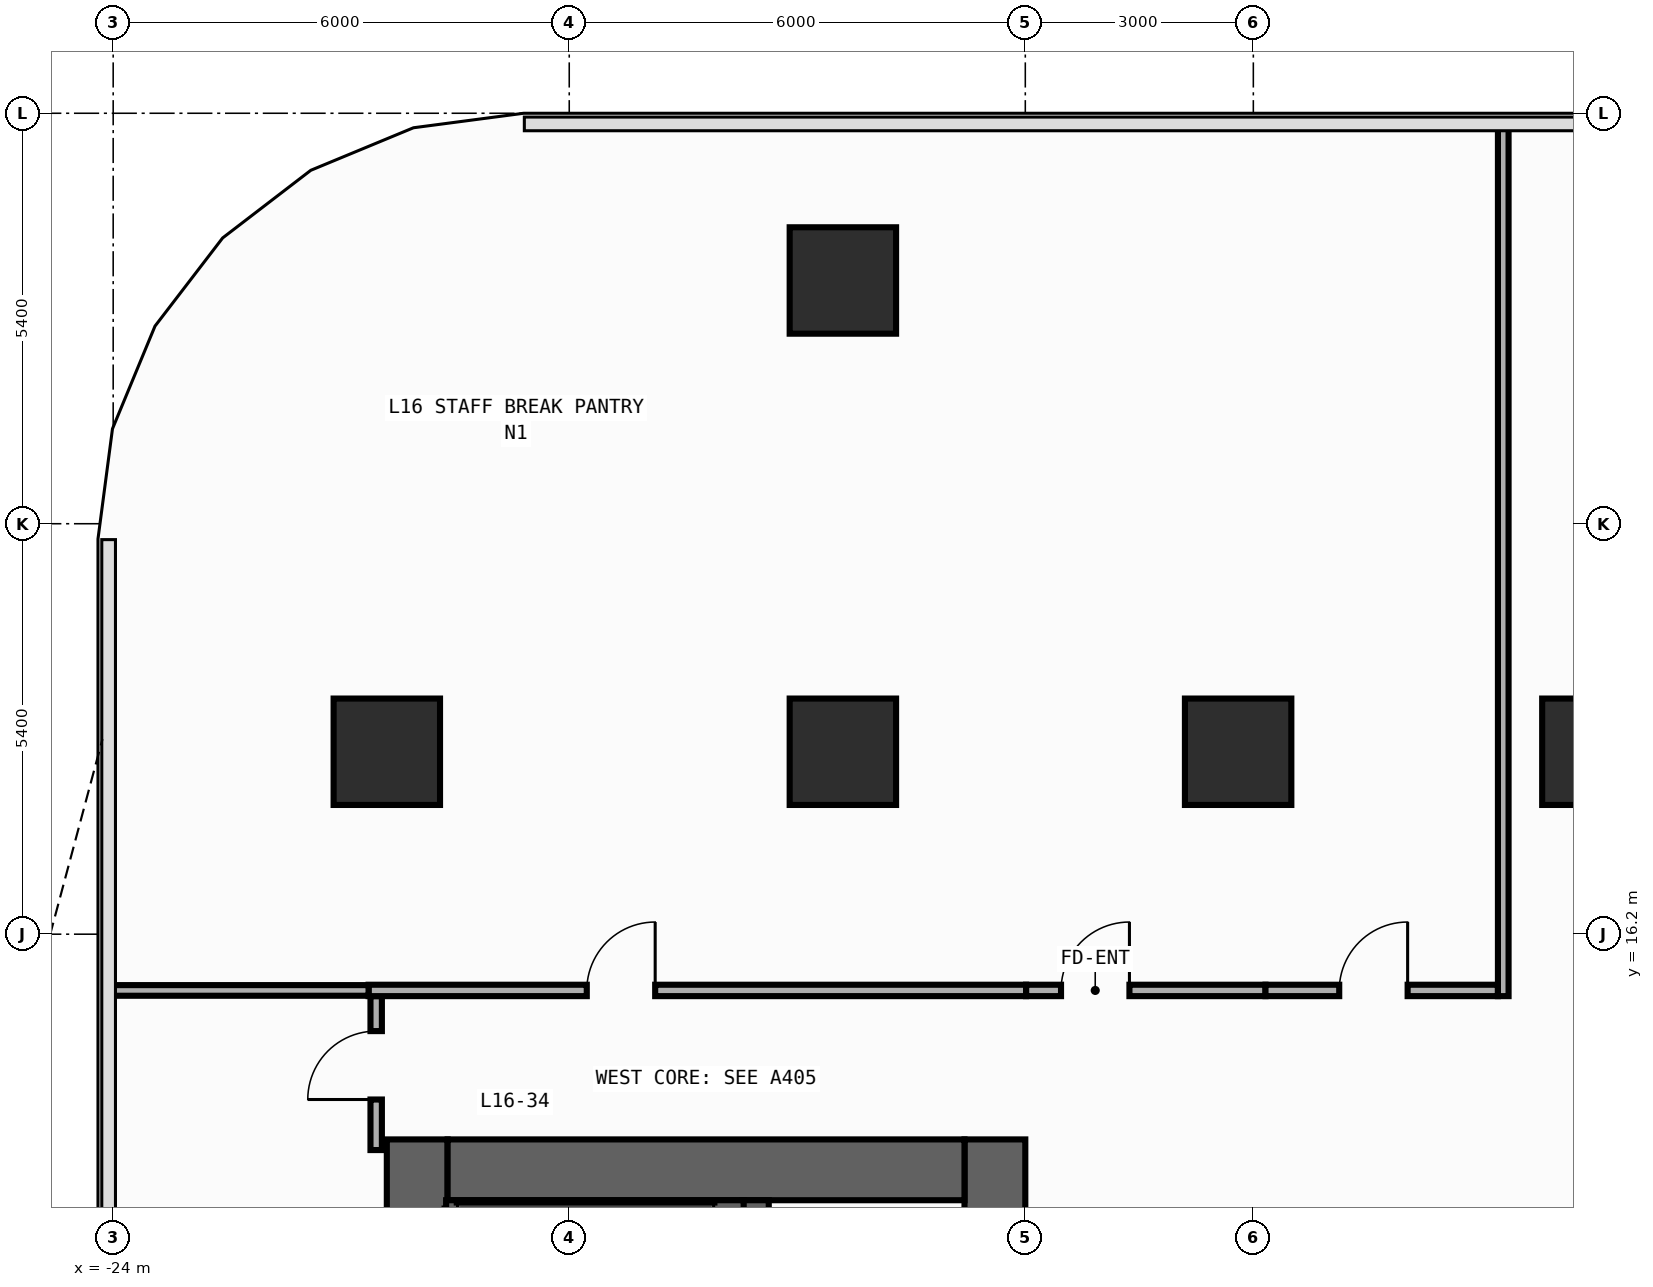
"""IFC4 building model, lengths in metres.
Left out: names, types, materials, properties, quantities, classifications, styles, units other than length and angle.
Written with IfcOpenShell. Run it as: python <this file> out.ifc"""

import sys

from ifc_helpers import new_model, si_unit, direction, frame, frame_2d, origin, origin_2d, place, context, subcontext, project, spatial, rectangle, extrude, element, fill, save


model = new_model("IFC4")
c1 = context("Model", 3, precision=1e-05, world=origin(), true_north=direction((0.0, 1.0)))
c2 = subcontext(c1, "Body", "Model", "MODEL_VIEW")
j1 = project(units=[si_unit("LENGTHUNIT", "METRE"), si_unit("PLANEANGLEUNIT", "RADIAN")], contexts=[c1])
p1 = place(None, origin())
s1 = spatial("IfcSite", under=j1, at=p1, CompositionType="ELEMENT")
p2 = place(p1, origin())
s2 = spatial("IfcBuilding", under=s1, at=p2, CompositionType="ELEMENT")
p3 = place(p2, frame((0.0, 0.0, 68.0)))
s3 = spatial("IfcBuildingStorey", under=s2, at=p3, CompositionType="ELEMENT", Elevation=68.0)
p4 = place(p3, frame((-20.0, -13.5, 0.0), z_axis=(0.0, 0.0, 1.0), x_axis=(0.0, 1.0, 0.0)))
e1 = element("IfcWall", 1, at=p4, inside=s3, PredefinedType="SHEAR", context=c2, shape_type="SweptSolid", body=[
    extrude(rectangle(XDim=27.0, YDim=0.8, at=frame_2d((13.5, 0.0))), origin(), (0.0, 0.0, 1.0), 3.94),
])
p5 = place(p3, frame((-12.4, -13.5, 0.0), z_axis=(0.0, 0.0, 1.0), x_axis=(0.0, 1.0, 0.0)))
e2 = element("IfcWall", 2, at=p5, inside=s3, PredefinedType="SHEAR", context=c2, shape_type="SweptSolid", body=[
    extrude(rectangle(XDim=27.0, YDim=0.8, at=frame_2d((13.5, 0.0))), origin(), (0.0, 0.0, 1.0), 3.94),
])
p6 = place(p5, frame((21.55, 0.0, 0.0)))
e3 = element("IfcOpeningElement", 3, at=p6, cuts=e2, PredefinedType="OPENING", context=c2, shape_type="SweptSolid", body=[
    extrude(rectangle(XDim=1.1, YDim=2.2, at=frame_2d((0.55, 1.1))), frame((0.0, 0.41, 0.0), z_axis=(0.0, -1.0, 0.0), x_axis=(1.0, 0.0, 0.0)), (0.0, 0.0, 1.0), 0.82),
])
p7 = place(p5, frame((18.35, 0.0, 0.0)))
e4 = element("IfcOpeningElement", 4, at=p7, cuts=e2, PredefinedType="OPENING", context=c2, shape_type="SweptSolid", body=[
    extrude(rectangle(XDim=1.1, YDim=2.2, at=frame_2d((0.55, 1.1))), frame((0.0, 0.41, 0.0), z_axis=(0.0, -1.0, 0.0), x_axis=(1.0, 0.0, 0.0)), (0.0, 0.0, 1.0), 0.82),
])
p8 = place(p5, frame((15.15, 0.0, 0.0)))
e5 = element("IfcOpeningElement", 5, at=p8, cuts=e2, PredefinedType="OPENING", context=c2, shape_type="SweptSolid", body=[
    extrude(rectangle(XDim=1.1, YDim=2.2, at=frame_2d((0.55, 1.1))), frame((0.0, 0.41, 0.0), z_axis=(0.0, -1.0, 0.0), x_axis=(1.0, 0.0, 0.0)), (0.0, 0.0, 1.0), 0.82),
])
p9 = place(p5, frame((10.35, 0.0, 0.0)))
e6 = element("IfcOpeningElement", 6, at=p9, cuts=e2, PredefinedType="OPENING", context=c2, shape_type="SweptSolid", body=[
    extrude(rectangle(XDim=1.1, YDim=2.2, at=frame_2d((0.55, 1.1))), frame((0.0, 0.41, 0.0), z_axis=(0.0, -1.0, 0.0), x_axis=(1.0, 0.0, 0.0)), (0.0, 0.0, 1.0), 0.82),
])
p10 = place(p5, frame((7.15, 0.0, 0.0)))
e7 = element("IfcOpeningElement", 7, at=p10, cuts=e2, PredefinedType="OPENING", context=c2, shape_type="SweptSolid", body=[
    extrude(rectangle(XDim=1.1, YDim=2.2, at=frame_2d((0.55, 1.1))), frame((0.0, 0.41, 0.0), z_axis=(0.0, -1.0, 0.0), x_axis=(1.0, 0.0, 0.0)), (0.0, 0.0, 1.0), 0.82),
])
p11 = place(p5, frame((3.95, 0.0, 0.0)))
e8 = element("IfcOpeningElement", 8, at=p11, cuts=e2, PredefinedType="OPENING", context=c2, shape_type="SweptSolid", body=[
    extrude(rectangle(XDim=1.1, YDim=2.2, at=frame_2d((0.55, 1.1))), frame((0.0, 0.41, 0.0), z_axis=(0.0, -1.0, 0.0), x_axis=(1.0, 0.0, 0.0)), (0.0, 0.0, 1.0), 0.82),
])
p12 = place(p5, frame((12.725, 0.0, 0.0)))
e9 = element("IfcOpeningElement", 9, at=p12, cuts=e2, PredefinedType="OPENING", context=c2, shape_type="SweptSolid", body=[
    extrude(rectangle(XDim=1.15, YDim=2.2, at=frame_2d((0.575, 1.1))), frame((0.0, 0.41, 0.0), z_axis=(0.0, -1.0, 0.0), x_axis=(1.0, 0.0, 0.0)), (0.0, 0.0, 1.0), 0.82),
])
p13 = place(p5, frame((1.625, 0.0, 0.0)))
e10 = element("IfcOpeningElement", 10, at=p13, cuts=e2, PredefinedType="OPENING", context=c2, shape_type="SweptSolid", body=[
    extrude(rectangle(XDim=0.85, YDim=2.1, at=frame_2d((0.425, 1.05))), frame((0.0, 0.41, 0.0), z_axis=(0.0, -1.0, 0.0), x_axis=(1.0, 0.0, 0.0)), (0.0, 0.0, 1.0), 0.82),
])
p14 = place(p3, frame((-19.6, 13.1, 0.0), z_axis=(0.0, 0.0, 1.0), x_axis=(1.0, 0.0, 0.0)))
e11 = element("IfcWall", 11, at=p14, inside=s3, PredefinedType="SHEAR", context=c2, shape_type="SweptSolid", body=[
    extrude(rectangle(XDim=6.8, YDim=0.8, at=frame_2d((3.4, 0.0))), origin(), (0.0, 0.0, 1.0), 3.94),
])
p15 = place(p3, frame((-15.55, -12.7, 0.0), z_axis=(0.0, 0.0, 1.0), x_axis=(0.0, 1.0, 0.0)))
e12 = element("IfcWall", 12, at=p15, inside=s3, PredefinedType="SHEAR", context=c2, shape_type="SweptSolid", body=[
    extrude(rectangle(XDim=25.4, YDim=0.35, at=frame_2d((12.7, 0.0))), origin(), (0.0, 0.0, 1.0), 3.94),
])
p16 = place(p15, frame((11.925, 0.0, 0.0)))
e13 = element("IfcOpeningElement", 13, at=p16, cuts=e12, PredefinedType="OPENING", context=c2, shape_type="SweptSolid", body=[
    extrude(rectangle(XDim=1.15, YDim=2.2, at=frame_2d((0.575, 1.1))), frame((0.0, 0.185, 0.0), z_axis=(0.0, -1.0, 0.0), x_axis=(1.0, 0.0, 0.0)), (0.0, 0.0, 1.0), 0.37),
])
p17 = place(p15, frame((0.825, 0.0, 0.0)))
e14 = element("IfcOpeningElement", 14, at=p17, cuts=e12, PredefinedType="OPENING", context=c2, shape_type="SweptSolid", body=[
    extrude(rectangle(XDim=0.85, YDim=2.1, at=frame_2d((0.425, 1.05))), frame((0.0, 0.185, 0.0), z_axis=(0.0, -1.0, 0.0), x_axis=(1.0, 0.0, 0.0)), (0.0, 0.0, 1.0), 0.37),
])
p18 = place(p3, frame((-19.62, 12.59, 0.0), z_axis=(0.0, 0.0, 1.0), x_axis=(1.0, 0.0, 0.0)))
e15 = element("IfcWall", 15, at=p18, inside=s3, PredefinedType="SHEAR", context=c2, shape_type="SweptSolid", body=[
    extrude(rectangle(XDim=3.915, YDim=0.22, at=frame_2d((1.958, 0.0))), origin(), (0.0, 0.0, 1.0), 3.94),
])
for number, where, z_axis, x_axis in (
    (16, (-9.2, 18.6, 0.0), (0.0, 0.0, 1.0), (1.0, 0.0, 0.0)),
    (17, (-20.4, 18.6, 0.0), (0.0, 0.0, 1.0), (1.0, 0.0, 0.0)),
    (18, (-14.4, 18.6, 0.0), (0.0, 0.0, 1.0), (1.0, 0.0, 0.0)),
    (19, (-4.5, 18.6, 0.0), (0.0, 0.0, 1.0), (1.0, 0.0, 0.0)),
    (20, (-14.4, 24.8, 0.0), (0.0, 0.0, 1.0), (1.0, 0.0, 0.0)),
):
    element("IfcColumn", number, at=place(p3, frame(where, z_axis=z_axis, x_axis=x_axis)), inside=s3, PredefinedType="COLUMN", context=c2, shape_type="SweptSolid", body=[
        extrude(rectangle(XDim=1.4, YDim=1.4, at=origin_2d()), origin(), (0.0, 0.0, 1.0), 4.2),
    ])
p19 = place(p3, frame((-11.99, 15.46, 0.0), z_axis=(0.0, 0.0, 1.0), x_axis=(1.0, 0.0, 0.0)))
e21 = element("IfcWall", 21, at=p19, inside=s3, PredefinedType="PARTITIONING", context=c2, shape_type="SweptSolid", body=[
    extrude(rectangle(XDim=3.15, YDim=0.15, at=frame_2d((1.575, 0.0))), origin(), (0.0, 0.0, 1.0), 3.94),
])
p20 = place(p19, frame((0.46, 0.0, 0.0)))
e22 = element("IfcOpeningElement", 22, at=p20, cuts=e21, PredefinedType="OPENING", context=c2, shape_type="SweptSolid", body=[
    extrude(rectangle(XDim=0.9, YDim=2.15, at=frame_2d((0.45, 1.075))), frame((0.0, 0.085, 0.0), z_axis=(0.0, -1.0, 0.0), x_axis=(1.0, 0.0, 0.0)), (0.0, 0.0, 1.0), 0.17),
])
p21 = place(p3, frame((-8.84, 15.46, 0.0), z_axis=(0.0, 0.0, 1.0), x_axis=(1.0, 0.0, 0.0)))
e23 = element("IfcWall", 23, at=p21, inside=s3, PredefinedType="PARTITIONING", context=c2, shape_type="SweptSolid", body=[
    extrude(rectangle(XDim=3.058, YDim=0.15, at=frame_2d((1.529, 0.0))), origin(), (0.0, 0.0, 1.0), 3.94),
])
p22 = place(p21, frame((0.97, 0.0, 0.0)))
e24 = element("IfcOpeningElement", 24, at=p22, cuts=e23, PredefinedType="OPENING", context=c2, shape_type="SweptSolid", body=[
    extrude(rectangle(XDim=0.9, YDim=2.15, at=frame_2d((0.45, 1.075))), frame((0.0, 0.085, 0.0), z_axis=(0.0, -1.0, 0.0), x_axis=(1.0, 0.0, 0.0)), (0.0, 0.0, 1.0), 0.17),
])
p23 = place(p3, frame((-20.54, 13.36, 0.0), z_axis=(0.0, 0.0, 1.0), x_axis=(0.0, 1.0, 0.0)))
e25 = element("IfcWall", 25, at=p23, inside=s3, PredefinedType="PARTITIONING", context=c2, shape_type="SweptSolid", body=[
    extrude(rectangle(XDim=2.025, YDim=0.15, at=frame_2d((1.012, 0.0))), origin(), (0.0, 0.0, 1.0), 3.94),
])
p24 = place(p23, frame((0.665, 0.0, 0.0)))
e26 = element("IfcOpeningElement", 26, at=p24, cuts=e25, PredefinedType="OPENING", context=c2, shape_type="SweptSolid", body=[
    extrude(rectangle(XDim=0.9, YDim=2.15, at=frame_2d((0.45, 1.075))), frame((0.0, 0.085, 0.0), z_axis=(0.0, -1.0, 0.0), x_axis=(1.0, 0.0, 0.0)), (0.0, 0.0, 1.0), 0.17),
])
p25 = place(p3, frame((-20.64, 15.46, 0.0), z_axis=(0.0, 0.0, 1.0), x_axis=(1.0, 0.0, 0.0)))
e27 = element("IfcWall", 27, at=p25, inside=s3, PredefinedType="PARTITIONING", context=c2, shape_type="SweptSolid", body=[
    extrude(rectangle(XDim=8.65, YDim=0.15, at=frame_2d((4.325, 0.0))), origin(), (0.0, 0.0, 1.0), 3.94),
])
p26 = place(p25, frame((2.871, 0.0, 0.0)))
e28 = element("IfcOpeningElement", 28, at=p26, cuts=e27, PredefinedType="OPENING", context=c2, shape_type="SweptSolid", body=[
    extrude(rectangle(XDim=0.9, YDim=2.15, at=frame_2d((0.45, 1.075))), frame((0.0, 0.085, 0.0), z_axis=(0.0, -1.0, 0.0), x_axis=(1.0, 0.0, 0.0)), (0.0, 0.0, 1.0), 0.17),
])
p27 = place(p3, frame((-24.055, 15.46, 0.0), z_axis=(0.0, 0.0, 1.0), x_axis=(1.0, 0.0, 0.0)))
e29 = element("IfcWall", 29, at=p27, inside=s3, PredefinedType="PARTITIONING", context=c2, shape_type="SweptSolid", body=[
    extrude(rectangle(XDim=3.415, YDim=0.14, at=frame_2d((1.708, 0.0))), origin(), (0.0, 0.0, 1.0), 3.94),
])
p28 = place(p3, frame((-5.712, 15.385, 0.0), z_axis=(0.0, 0.0, 1.0), x_axis=(0.0, 1.0, 0.0)))
e30 = element("IfcWall", 30, at=p28, inside=s3, PredefinedType="PARTITIONING", context=c2, shape_type="SweptSolid", body=[
    extrude(rectangle(XDim=11.47, YDim=0.14, at=frame_2d((5.735, 0.0))), origin(), (0.0, 0.0, 1.0), 3.94),
])
p29 = place(p20, origin())
e31 = element("IfcDoor", 31, at=p29, inside=s3, OperationType="SINGLE_SWING_RIGHT", PredefinedType="DOOR", context=c2, shape_type="SweptSolid", body=[
    extrude(rectangle(XDim=0.9, YDim=2.15, at=frame_2d((0.45, 1.075))), frame((0.0, 0.025, 0.0), z_axis=(0.0, -1.0, 0.0), x_axis=(1.0, 0.0, 0.0)), (0.0, 0.0, 1.0), 0.05),
])
fill(e22, e31)
p30 = place(p22, origin())
e32 = element("IfcDoor", 32, at=p30, inside=s3, OperationType="SINGLE_SWING_RIGHT", PredefinedType="DOOR", context=c2, shape_type="SweptSolid", body=[
    extrude(rectangle(XDim=0.9, YDim=2.15, at=frame_2d((0.45, 1.075))), frame((0.0, 0.025, 0.0), z_axis=(0.0, -1.0, 0.0), x_axis=(1.0, 0.0, 0.0)), (0.0, 0.0, 1.0), 0.05),
])
fill(e24, e32)
p31 = place(p24, origin())
e33 = element("IfcDoor", 33, at=p31, inside=s3, OperationType="SINGLE_SWING_LEFT", PredefinedType="DOOR", context=c2, shape_type="SweptSolid", body=[
    extrude(rectangle(XDim=0.9, YDim=2.15, at=frame_2d((0.45, 1.075))), frame((0.0, 0.025, 0.0), z_axis=(0.0, -1.0, 0.0), x_axis=(1.0, 0.0, 0.0)), (0.0, 0.0, 1.0), 0.05),
])
fill(e26, e33)
p32 = place(p26, origin())
e34 = element("IfcDoor", 34, at=p32, inside=s3, OperationType="SINGLE_SWING_RIGHT", PredefinedType="DOOR", context=c2, shape_type="SweptSolid", body=[
    extrude(rectangle(XDim=0.9, YDim=2.15, at=frame_2d((0.45, 1.075))), frame((0.0, 0.025, 0.0), z_axis=(0.0, -1.0, 0.0), x_axis=(1.0, 0.0, 0.0)), (0.0, 0.0, 1.0), 0.05),
])
fill(e28, e34)
save(model, sys.argv[1])
